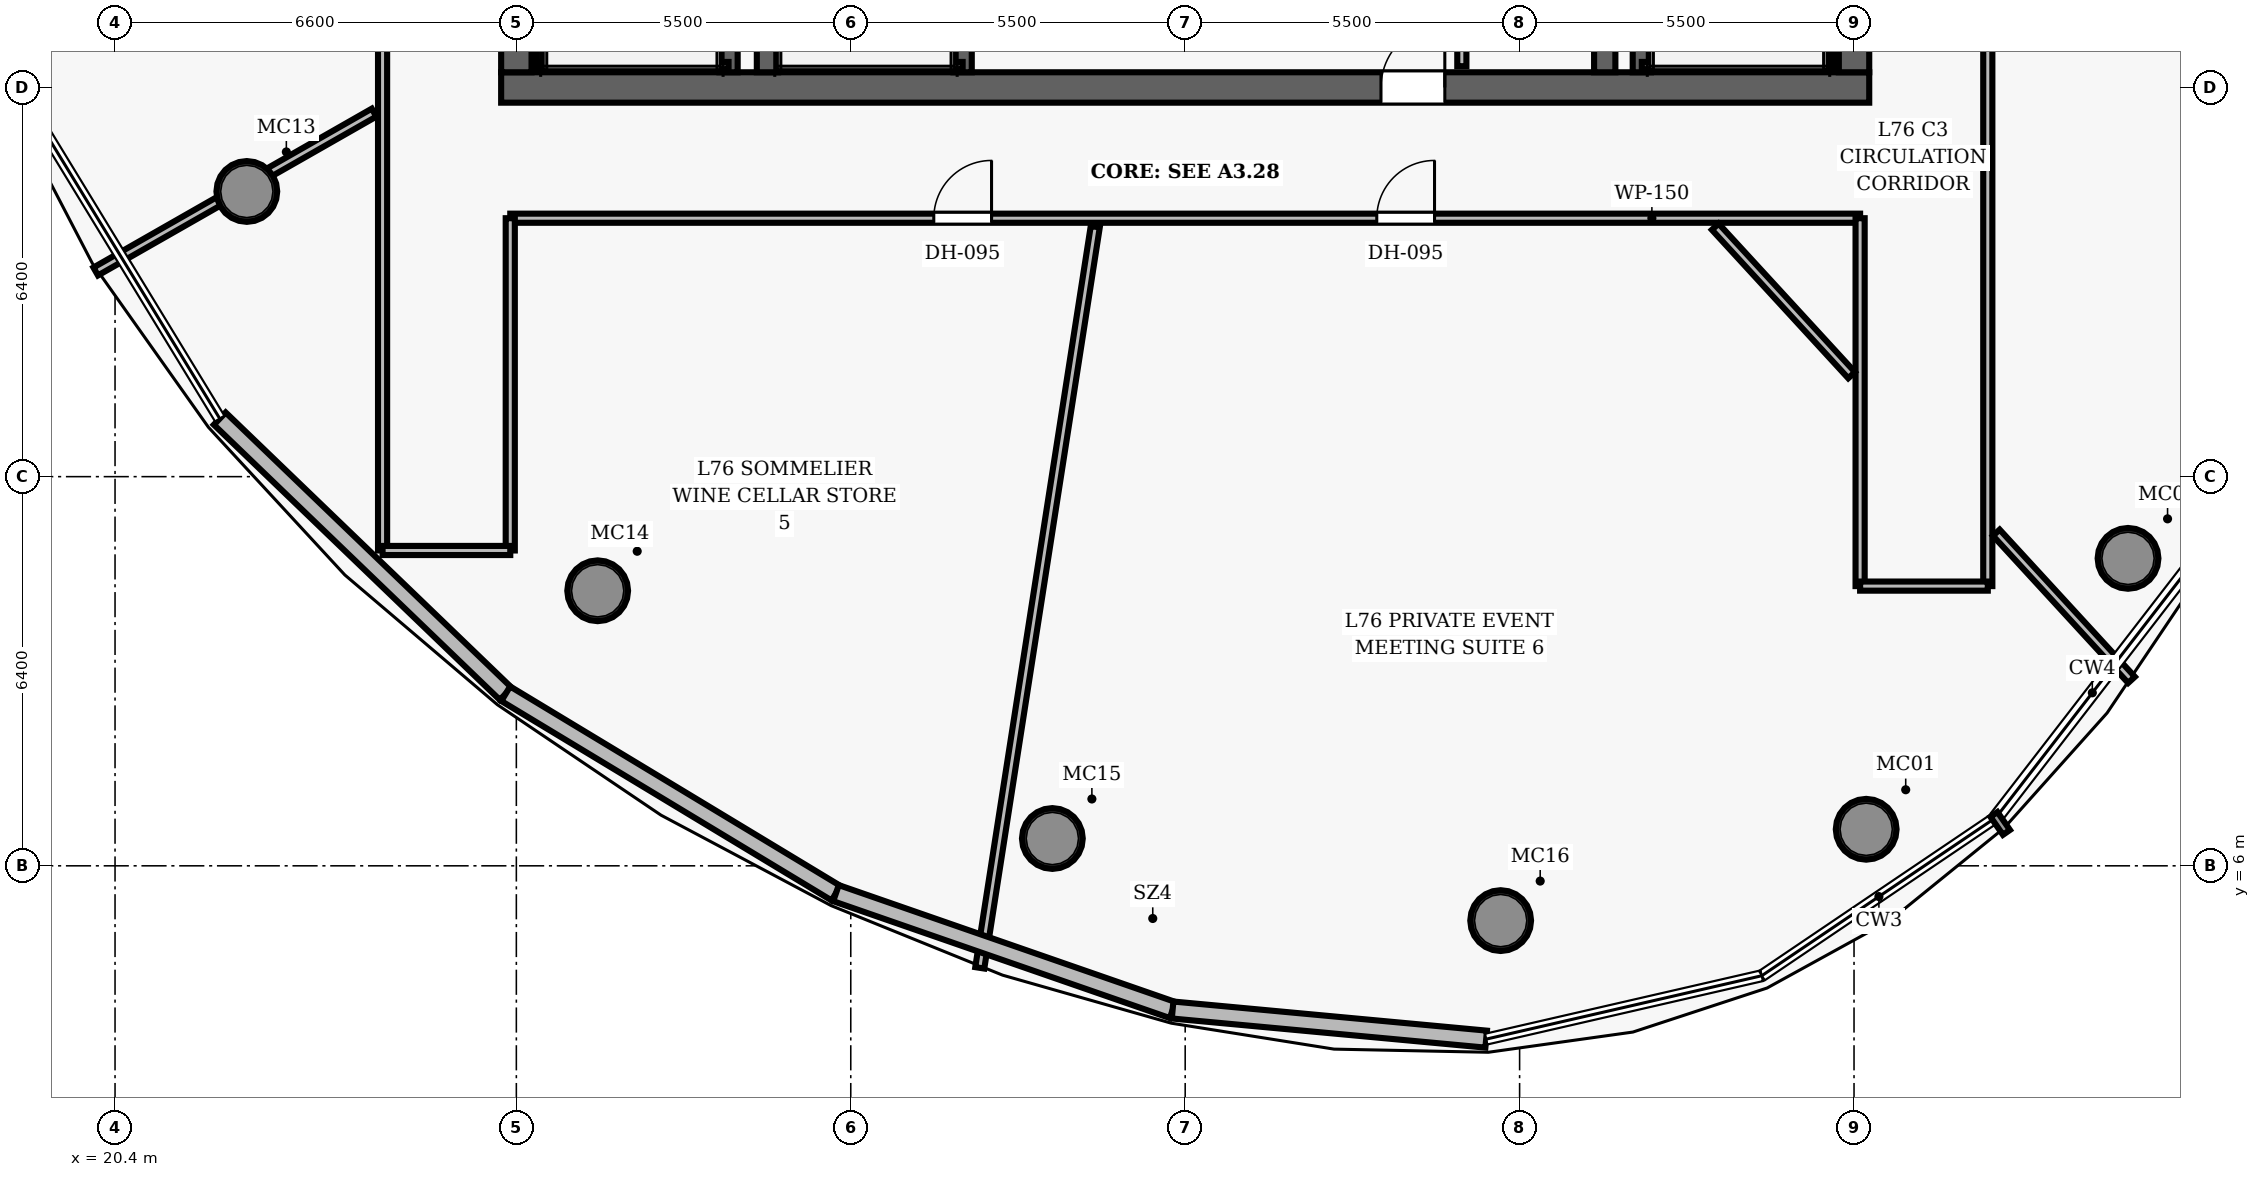
"""IFC4 building model, lengths in metres.
Left out: names, types, materials, properties, quantities, classifications, styles, units other than length and angle.
Written with IfcOpenShell. Run it as: python <this file> out.ifc"""

import sys

from ifc_helpers import new_model, si_unit, direction, frame, frame_2d, origin, origin_2d, place, context, subcontext, project, spatial, rectangle, hollow_circle, extrude, element, fill, save


model = new_model("IFC4")
c1 = context("Model", 3, precision=1e-05, world=origin(), true_north=direction((0.0, 1.0)))
c2 = subcontext(c1, "Body", "Model", "MODEL_VIEW")
j1 = project(units=[si_unit("LENGTHUNIT", "METRE"), si_unit("PLANEANGLEUNIT", "RADIAN")], contexts=[c1])
p1 = place(None, origin())
s1 = spatial("IfcSite", under=j1, at=p1, CompositionType="ELEMENT")
p2 = place(p1, origin())
s2 = spatial("IfcBuilding", under=s1, at=p2, CompositionType="ELEMENT")
p3 = place(p2, frame((0.0, 0.0, 299.8)))
s3 = spatial("IfcBuildingStorey", under=s2, at=p3, CompositionType="ELEMENT", Elevation=299.8)
p4 = place(p3, frame((26.75, 18.8, 0.0), z_axis=(0.0, 0.0, 1.0), x_axis=(1.0, 0.0, 0.0)))
e1 = element("IfcWall", 1, at=p4, inside=s3, PredefinedType="SHEAR", context=c2, shape_type="SweptSolid", body=[
    extrude(rectangle(XDim=22.5, YDim=0.5, at=frame_2d((11.25, 0.0))), origin(), (0.0, 0.0, 1.0), 3.85),
])
p5 = place(p4, frame((14.47, 0.0, 0.0)))
e2 = element("IfcOpeningElement", 2, at=p5, cuts=e1, PredefinedType="OPENING", context=c2, shape_type="SweptSolid", body=[
    extrude(rectangle(XDim=1.05, YDim=2.15, at=frame_2d((0.525, 1.075))), frame((0.0, 0.26, 0.0), z_axis=(0.0, -1.0, 0.0), x_axis=(1.0, 0.0, 0.0)), (0.0, 0.0, 1.0), 0.52),
])
p6 = place(p3, frame((27.0, 19.05, 0.0), z_axis=(0.0, 0.0, 1.0), x_axis=(0.0, 1.0, 0.0)))
e3 = element("IfcWall", 3, at=p6, inside=s3, PredefinedType="SHEAR", context=c2, shape_type="SweptSolid", body=[
    extrude(rectangle(XDim=13.9, YDim=0.5, at=frame_2d((6.95, 0.0))), origin(), (0.0, 0.0, 1.0), 3.85),
])
p7 = place(p6, frame((8.2, 0.0, 0.0)))
e4 = element("IfcOpeningElement", 4, at=p7, cuts=e3, PredefinedType="OPENING", context=c2, shape_type="SweptSolid", body=[
    extrude(rectangle(XDim=1.05, YDim=2.15, at=frame_2d((0.525, 1.075))), frame((0.0, 0.26, 0.0), z_axis=(0.0, -1.0, 0.0), x_axis=(1.0, 0.0, 0.0)), (0.0, 0.0, 1.0), 0.52),
])
p8 = place(p3, frame((49.0, 19.05, 0.0), z_axis=(0.0, 0.0, 1.0), x_axis=(0.0, 1.0, 0.0)))
e5 = element("IfcWall", 5, at=p8, inside=s3, PredefinedType="SHEAR", context=c2, shape_type="SweptSolid", body=[
    extrude(rectangle(XDim=13.9, YDim=0.5, at=frame_2d((6.95, 0.0))), origin(), (0.0, 0.0, 1.0), 3.85),
])
p9 = place(p8, frame((8.2, 0.0, 0.0)))
e6 = element("IfcOpeningElement", 6, at=p9, cuts=e5, PredefinedType="OPENING", context=c2, shape_type="SweptSolid", body=[
    extrude(rectangle(XDim=1.05, YDim=2.15, at=frame_2d((0.525, 1.075))), frame((0.0, 0.26, 0.0), z_axis=(0.0, -1.0, 0.0), x_axis=(1.0, 0.0, 0.0)), (0.0, 0.0, 1.0), 0.52),
])
for number, where, z_axis, x_axis in (
    (7, (31.13, 19.05, 0.0), (0.0, 0.0, 1.0), (0.0, 1.0, 0.0)),
    (8, (44.9, 19.05, 0.0), (0.0, 0.0, 1.0), (0.0, 1.0, 0.0)),
):
    element("IfcWall", number, at=place(p3, frame(where, z_axis=z_axis, x_axis=x_axis)), inside=s3, PredefinedType="SHEAR", context=c2, shape_type="SweptSolid", body=[
        extrude(rectangle(XDim=13.9, YDim=0.35, at=frame_2d((6.95, 0.0))), origin(), (0.0, 0.0, 1.0), 3.85),
    ])
for number, where, z_axis, x_axis in (
    (9, (49.2, 6.601, 0.0), (0.0, 0.0, 1.0), (1.0, 0.0, 0.0)),
    (10, (53.506, 11.056, 0.0), (0.0, 0.0, 1.0), (1.0, 0.0, 0.0)),
    (11, (22.567, 17.09, 0.0), (0.0, 0.0, 1.0), (1.0, 0.0, 0.0)),
    (12, (28.338, 10.523, 0.0), (0.0, 0.0, 1.0), (1.0, 0.0, 0.0)),
    (13, (35.815, 6.449, 0.0), (0.0, 0.0, 1.0), (1.0, 0.0, 0.0)),
    (14, (43.188, 5.099, 0.0), (0.0, 0.0, 1.0), (1.0, 0.0, 0.0)),
):
    element("IfcColumn", number, at=place(p3, frame(where, z_axis=z_axis, x_axis=x_axis)), inside=s3, PredefinedType="COLUMN", context=c2, shape_type="SweptSolid", body=[
        extrude(hollow_circle(Radius=0.5, WallThickness=0.045, at=origin_2d()), origin(), (0.0, 0.0, 1.0), 3.85),
    ])
p10 = place(p3, frame((30.49, 19.05, 0.0), z_axis=(0.0, 0.0, 1.0), x_axis=(0.0, 1.0, 0.0)))
e15 = element("IfcWall", 15, at=p10, inside=s3, PredefinedType="SHEAR", context=c2, shape_type="SweptSolid", body=[
    extrude(rectangle(XDim=7.5, YDim=0.3, at=frame_2d((3.75, 0.0))), origin(), (0.0, 0.0, 1.0), 3.85),
])
p11 = place(p3, frame((27.395, 19.1, 0.0), z_axis=(0.0, 0.0, 1.0), x_axis=(0.0, 1.0, 0.0)))
e16 = element("IfcWall", 16, at=p11, inside=s3, PredefinedType="SHEAR", context=c2, shape_type="SweptSolid", body=[
    extrude(rectangle(XDim=7.45, YDim=0.12, at=frame_2d((3.725, 0.0))), origin(), (0.0, 0.0, 1.0), 3.85),
])
p12 = place(p3, frame((27.395, 19.16, 0.0), z_axis=(0.0, 0.0, 1.0), x_axis=(1.0, 0.0, 0.0)))
e17 = element("IfcWall", 17, at=p12, inside=s3, PredefinedType="SHEAR", context=c2, shape_type="SweptSolid", body=[
    extrude(rectangle(XDim=3.095, YDim=0.12, at=frame_2d((1.547, 0.0))), origin(), (0.0, 0.0, 1.0), 3.85),
])
p13 = place(p3, frame((45.51, 19.05, 0.0), z_axis=(0.0, 0.0, 1.0), x_axis=(0.0, 1.0, 0.0)))
e18 = element("IfcWall", 18, at=p13, inside=s3, PredefinedType="SHEAR", context=c2, shape_type="SweptSolid", body=[
    extrude(rectangle(XDim=7.5, YDim=0.3, at=frame_2d((3.75, 0.0))), origin(), (0.0, 0.0, 1.0), 3.85),
])
p14 = place(p3, frame((48.605, 19.1, 0.0), z_axis=(0.0, 0.0, 1.0), x_axis=(0.0, 1.0, 0.0)))
e19 = element("IfcWall", 19, at=p14, inside=s3, PredefinedType="SHEAR", context=c2, shape_type="SweptSolid", body=[
    extrude(rectangle(XDim=7.45, YDim=0.12, at=frame_2d((3.725, 0.0))), origin(), (0.0, 0.0, 1.0), 3.85),
])
p15 = place(p3, frame((45.51, 19.16, 0.0), z_axis=(0.0, 0.0, 1.0), x_axis=(1.0, 0.0, 0.0)))
e20 = element("IfcWall", 20, at=p15, inside=s3, PredefinedType="SHEAR", context=c2, shape_type="SweptSolid", body=[
    extrude(rectangle(XDim=3.095, YDim=0.12, at=frame_2d((1.547, 0.0))), origin(), (0.0, 0.0, 1.0), 3.85),
])
p16 = place(p3, frame((34.34, 19.05, 0.0), z_axis=(0.0, 0.0, 1.0), x_axis=(0.0, 1.0, 0.0)))
e21 = element("IfcWall", 21, at=p16, inside=s3, PredefinedType="SHEAR", context=c2, shape_type="SweptSolid", body=[
    extrude(rectangle(XDim=7.5, YDim=0.3, at=frame_2d((3.75, 0.0))), origin(), (0.0, 0.0, 1.0), 3.85),
])
p17 = place(p3, frame((31.3, 19.16, 0.0), z_axis=(0.0, 0.0, 1.0), x_axis=(1.0, 0.0, 0.0)))
e22 = element("IfcWall", 22, at=p17, inside=s3, PredefinedType="SHEAR", context=c2, shape_type="SweptSolid", body=[
    extrude(rectangle(XDim=3.04, YDim=0.12, at=frame_2d((1.52, 0.0))), origin(), (0.0, 0.0, 1.0), 3.85),
])
p18 = place(p3, frame((42.55, 19.15, 0.0), z_axis=(0.0, 0.0, 1.0), x_axis=(0.0, 1.0, 0.0)))
e23 = element("IfcWall", 23, at=p18, inside=s3, PredefinedType="PARTITIONING", context=c2, shape_type="SweptSolid", body=[
    extrude(rectangle(XDim=2.75, YDim=0.15, at=frame_2d((1.375, 0.0))), origin(), (0.0, 0.0, 1.0), 3.04),
])
p19 = place(p18, frame((0.7, 0.0, 0.0)))
e24 = element("IfcOpeningElement", 24, at=p19, cuts=e23, PredefinedType="OPENING", context=c2, shape_type="SweptSolid", body=[
    extrude(rectangle(XDim=0.85, YDim=2.1, at=frame_2d((0.425, 1.05))), frame((0.0, 0.085, 0.0), z_axis=(0.0, -1.0, 0.0), x_axis=(1.0, 0.0, 0.0)), (0.0, 0.0, 1.0), 0.17),
])
p20 = place(p3, frame((26.9, 16.65, 0.0), z_axis=(0.0, 0.0, 1.0), x_axis=(1.0, 0.0, 0.0)))
e25 = element("IfcWall", 25, at=p20, inside=s3, PredefinedType="PARTITIONING", context=c2, shape_type="SweptSolid", body=[
    extrude(rectangle(XDim=22.2, YDim=0.15, at=frame_2d((11.1, 0.0))), origin(), (0.0, 0.0, 1.0), 3.04),
])
p21 = place(p20, frame((6.965, 0.0, 0.0)))
e26 = element("IfcOpeningElement", 26, at=p21, cuts=e25, PredefinedType="OPENING", context=c2, shape_type="SweptSolid", body=[
    extrude(rectangle(XDim=0.95, YDim=2.15, at=frame_2d((0.475, 1.075))), frame((0.0, 0.085, 0.0), z_axis=(0.0, -1.0, 0.0), x_axis=(1.0, 0.0, 0.0)), (0.0, 0.0, 1.0), 0.17),
])
p22 = place(p20, frame((14.251, 0.0, 0.0)))
e27 = element("IfcOpeningElement", 27, at=p22, cuts=e25, PredefinedType="OPENING", context=c2, shape_type="SweptSolid", body=[
    extrude(rectangle(XDim=0.95, YDim=2.15, at=frame_2d((0.475, 1.075))), frame((0.0, 0.085, 0.0), z_axis=(0.0, -1.0, 0.0), x_axis=(1.0, 0.0, 0.0)), (0.0, 0.0, 1.0), 0.17),
])
p23 = place(p3, frame((24.8, 11.186, 0.0), z_axis=(0.0, 0.0, 1.0), x_axis=(0.0, 1.0, 0.0)))
e28 = element("IfcWall", 28, at=p23, inside=s3, PredefinedType="PARTITIONING", context=c2, shape_type="SweptSolid", body=[
    extrude(rectangle(XDim=30.214, YDim=0.15, at=frame_2d((15.107, 0.0))), origin(), (0.0, 0.0, 1.0), 3.04),
])
p24 = place(p23, frame((16.564, 0.0, 0.0)))
e29 = element("IfcOpeningElement", 29, at=p24, cuts=e28, PredefinedType="OPENING", context=c2, shape_type="SweptSolid", body=[
    extrude(rectangle(XDim=0.95, YDim=2.15, at=frame_2d((0.475, 1.075))), frame((0.0, 0.085, 0.0), z_axis=(0.0, -1.0, 0.0), x_axis=(1.0, 0.0, 0.0)), (0.0, 0.0, 1.0), 0.17),
])
p25 = place(p3, frame((26.9, 11.186, 0.0), z_axis=(0.0, 0.0, 1.0), x_axis=(0.0, 1.0, 0.0)))
e30 = element("IfcWall", 30, at=p25, inside=s3, PredefinedType="PARTITIONING", context=c2, shape_type="SweptSolid", body=[
    extrude(rectangle(XDim=5.464, YDim=0.15, at=frame_2d((2.732, 0.0))), origin(), (0.0, 0.0, 1.0), 3.04),
])
p26 = place(p3, frame((24.8, 11.186, 0.0), z_axis=(0.0, 0.0, 1.0), x_axis=(1.0, 0.0, 0.0)))
e31 = element("IfcWall", 31, at=p26, inside=s3, PredefinedType="PARTITIONING", context=c2, shape_type="SweptSolid", body=[
    extrude(rectangle(XDim=2.1, YDim=0.15, at=frame_2d((1.05, 0.0))), origin(), (0.0, 0.0, 1.0), 3.04),
])
p27 = place(p3, frame((51.2, 10.6, 0.0), z_axis=(0.0, 0.0, 1.0), x_axis=(0.0, 1.0, 0.0)))
e32 = element("IfcWall", 32, at=p27, inside=s3, PredefinedType="PARTITIONING", context=c2, shape_type="SweptSolid", body=[
    extrude(rectangle(XDim=30.8, YDim=0.15, at=frame_2d((15.4, 0.0))), origin(), (0.0, 0.0, 1.0), 3.04),
])
p28 = place(p27, frame((18.976, 0.0, 0.0)))
e33 = element("IfcOpeningElement", 33, at=p28, cuts=e32, PredefinedType="OPENING", context=c2, shape_type="SweptSolid", body=[
    extrude(rectangle(XDim=1.5, YDim=2.2, at=frame_2d((0.75, 1.1))), frame((0.0, 0.085, 0.0), z_axis=(0.0, -1.0, 0.0), x_axis=(1.0, 0.0, 0.0)), (0.0, 0.0, 1.0), 0.17),
])
p29 = place(p27, frame((12.135, 0.0, 0.0)))
e34 = element("IfcOpeningElement", 34, at=p29, cuts=e32, PredefinedType="OPENING", context=c2, shape_type="SweptSolid", body=[
    extrude(rectangle(XDim=0.95, YDim=2.15, at=frame_2d((0.475, 1.075))), frame((0.0, 0.085, 0.0), z_axis=(0.0, -1.0, 0.0), x_axis=(1.0, 0.0, 0.0)), (0.0, 0.0, 1.0), 0.17),
])
p30 = place(p3, frame((49.1, 10.6, 0.0), z_axis=(0.0, 0.0, 1.0), x_axis=(0.0, 1.0, 0.0)))
e35 = element("IfcWall", 35, at=p30, inside=s3, PredefinedType="PARTITIONING", context=c2, shape_type="SweptSolid", body=[
    extrude(rectangle(XDim=6.05, YDim=0.15, at=frame_2d((3.025, 0.0))), origin(), (0.0, 0.0, 1.0), 3.04),
])
p31 = place(p3, frame((49.1, 10.6, 0.0), z_axis=(0.0, 0.0, 1.0), x_axis=(1.0, 0.0, 0.0)))
e36 = element("IfcWall", 36, at=p31, inside=s3, PredefinedType="PARTITIONING", context=c2, shape_type="SweptSolid", body=[
    extrude(rectangle(XDim=2.1, YDim=0.15, at=frame_2d((1.05, 0.0))), origin(), (0.0, 0.0, 1.0), 3.04),
])
p32 = place(p3, frame((24.66, 18.387, 0.0), z_axis=(0.0, 0.0, 1.0), x_axis=(-0.868499553792, -0.495689948519, 0.0)))
e37 = element("IfcWall", 37, at=p32, inside=s3, PredefinedType="PARTITIONING", context=c2, shape_type="SweptSolid", body=[
    extrude(rectangle(XDim=5.271, YDim=0.15, at=frame_2d((2.635, 0.0))), origin(), (0.0, 0.0, 1.0), 3.04),
])
p33 = place(p3, frame((36.521, 16.51, 0.0), z_axis=(0.0, 0.0, 1.0), x_axis=(-0.153984417471, -0.988073276218, 0.0)))
e38 = element("IfcWall", 38, at=p33, inside=s3, PredefinedType="PARTITIONING", context=c2, shape_type="SweptSolid", body=[
    extrude(rectangle(XDim=12.335, YDim=0.15, at=frame_2d((6.167, 0.0))), origin(), (0.0, 0.0, 1.0), 3.04),
])
p34 = place(p3, frame((46.718, 16.51, 0.0), z_axis=(0.0, 0.0, 1.0), x_axis=(0.676491436153, -0.736450498548, 0.0)))
e39 = element("IfcWall", 39, at=p34, inside=s3, PredefinedType="PARTITIONING", context=c2, shape_type="SweptSolid", body=[
    extrude(rectangle(XDim=3.314, YDim=0.15, at=frame_2d((1.657, 0.0))), origin(), (0.0, 0.0, 1.0), 3.04),
])
p35 = place(p3, frame((51.34, 11.478, 0.0), z_axis=(0.0, 0.0, 1.0), x_axis=(0.676538208378, -0.736407531605, 0.0)))
e40 = element("IfcWall", 40, at=p35, inside=s3, PredefinedType="PARTITIONING", context=c2, shape_type="SweptSolid", body=[
    extrude(rectangle(XDim=3.287, YDim=0.15, at=frame_2d((1.644, 0.0))), origin(), (0.0, 0.0, 1.0), 3.04),
])
p36 = place(p3, frame((26.825, 8.83, 0.0), z_axis=(0.0, 0.0, 1.0), x_axis=(-0.720647575414, 0.693301573668, 0.0)))
e41 = element("IfcWall", 41, at=p36, inside=s3, PredefinedType="SOLIDWALL", context=c2, shape_type="SweptSolid", body=[
    extrude(rectangle(XDim=6.526, YDim=0.28, at=frame_2d((3.263, 0.0))), origin(), (0.0, 0.0, 1.0), 3.625),
])
p37 = place(p3, frame((32.257, 5.55, 0.0), z_axis=(0.0, 0.0, 1.0), x_axis=(-0.856070548503, 0.516858990428, 0.0)))
e42 = element("IfcWall", 42, at=p37, inside=s3, PredefinedType="SOLIDWALL", context=c2, shape_type="SweptSolid", body=[
    extrude(rectangle(XDim=6.345, YDim=0.28, at=frame_2d((3.173, 0.0))), origin(), (0.0, 0.0, 1.0), 3.625),
])
p38 = place(p3, frame((37.793, 3.629, 0.0), z_axis=(0.0, 0.0, 1.0), x_axis=(-0.944702886808, 0.327927515857, 0.0)))
e43 = element("IfcWall", 43, at=p38, inside=s3, PredefinedType="SOLIDWALL", context=c2, shape_type="SweptSolid", body=[
    extrude(rectangle(XDim=5.86, YDim=0.28, at=frame_2d((2.93, 0.0))), origin(), (0.0, 0.0, 1.0), 3.625),
])
p39 = place(p3, frame((42.95, 3.15, 0.0), z_axis=(0.0, 0.0, 1.0), x_axis=(-0.995718285379, 0.092439689326, 0.0)))
e44 = element("IfcWall", 44, at=p39, inside=s3, PredefinedType="SOLIDWALL", context=c2, shape_type="SweptSolid", body=[
    extrude(rectangle(XDim=5.179, YDim=0.28, at=frame_2d((2.59, 0.0))), origin(), (0.0, 0.0, 1.0), 3.625),
])
p40 = place(p5, origin())
e45 = element("IfcDoor", 45, at=p40, inside=s3, OperationType="SINGLE_SWING_RIGHT", PredefinedType="DOOR", context=c2, shape_type="SweptSolid", body=[
    extrude(rectangle(XDim=1.05, YDim=2.15, at=frame_2d((0.525, 1.075))), frame((0.0, 0.025, 0.0), z_axis=(0.0, -1.0, 0.0), x_axis=(1.0, 0.0, 0.0)), (0.0, 0.0, 1.0), 0.05),
])
fill(e2, e45)
p41 = place(p21, origin())
e46 = element("IfcDoor", 46, at=p41, inside=s3, OperationType="SINGLE_SWING_RIGHT", PredefinedType="DOOR", context=c2, shape_type="SweptSolid", body=[
    extrude(rectangle(XDim=0.95, YDim=2.15, at=frame_2d((0.475, 1.075))), frame((0.0, 0.025, 0.0), z_axis=(0.0, -1.0, 0.0), x_axis=(1.0, 0.0, 0.0)), (0.0, 0.0, 1.0), 0.05),
])
fill(e26, e46)
p42 = place(p22, origin())
e47 = element("IfcDoor", 47, at=p42, inside=s3, OperationType="SINGLE_SWING_RIGHT", PredefinedType="DOOR", context=c2, shape_type="SweptSolid", body=[
    extrude(rectangle(XDim=0.95, YDim=2.15, at=frame_2d((0.475, 1.075))), frame((0.0, 0.025, 0.0), z_axis=(0.0, -1.0, 0.0), x_axis=(1.0, 0.0, 0.0)), (0.0, 0.0, 1.0), 0.05),
])
fill(e27, e47)
save(model, sys.argv[1])
